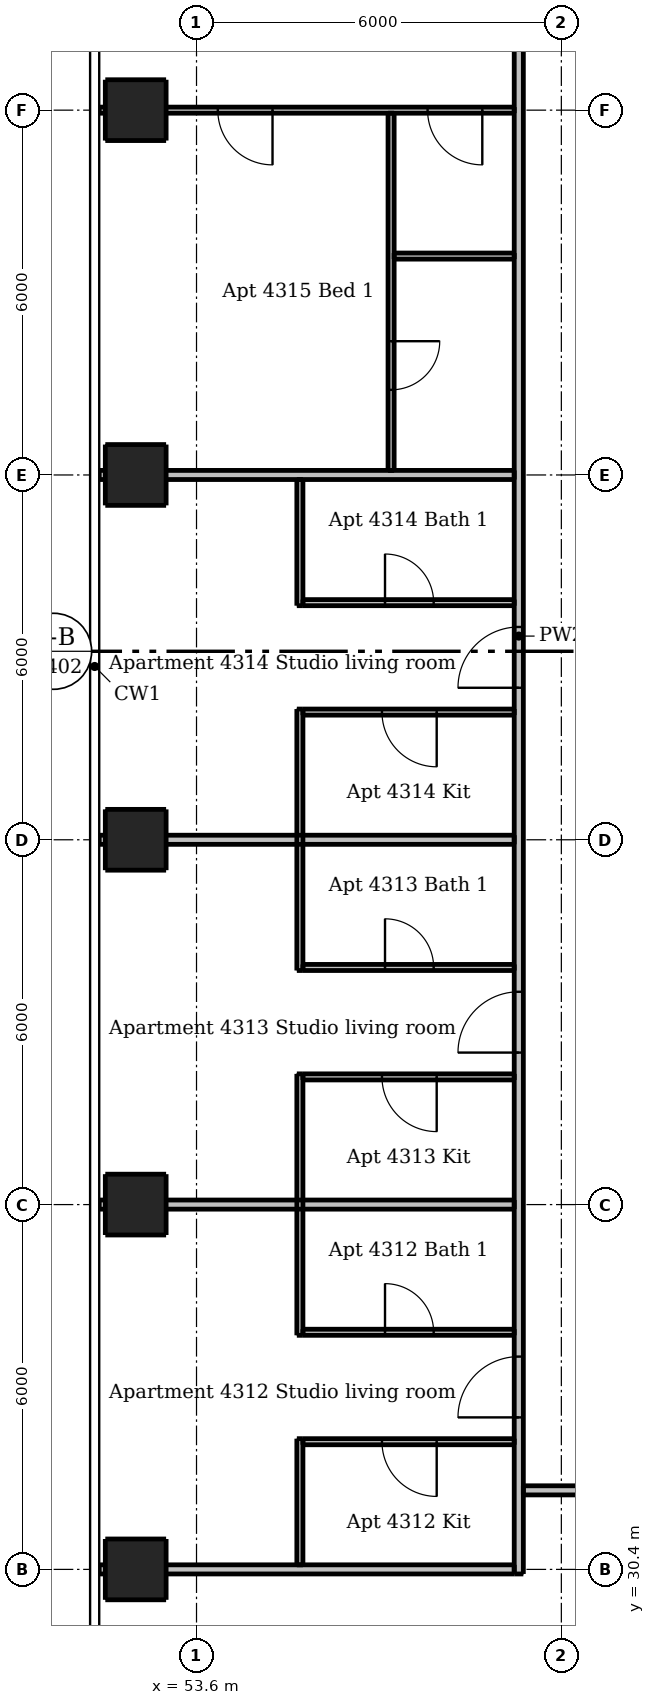
"""IFC4 building model, lengths in metres.
Left out: names, types, materials, properties, quantities, classifications, styles, units other than length and angle.
Written with IfcOpenShell. Run it as: python <this file> out.ifc"""

import sys

from ifc_helpers import new_model, si_unit, direction, frame, frame_2d, origin, origin_2d, place, context, subcontext, project, spatial, rectangle, extrude, element, fill, save


model = new_model("IFC4")
c1 = context("Model", 3, precision=1e-05, world=origin(), true_north=direction((0.0, 1.0)))
c2 = subcontext(c1, "Body", "Model", "MODEL_VIEW")
j1 = project(units=[si_unit("LENGTHUNIT", "METRE"), si_unit("PLANEANGLEUNIT", "RADIAN")], contexts=[c1])
p1 = place(None, origin())
s1 = spatial("IfcSite", under=j1, at=p1, CompositionType="ELEMENT")
p2 = place(p1, origin())
s2 = spatial("IfcBuilding", under=s1, at=p2, CompositionType="ELEMENT")
p3 = place(p2, frame((0.0, 0.0, 161.5)))
s3 = spatial("IfcBuildingStorey", under=s2, at=p3, CompositionType="ELEMENT", Elevation=161.5)
for number, where, z_axis, x_axis in (
    (1, (52.6, 30.4, 0.0), (0.0, 0.0, 1.0), (1.0, 0.0, 0.0)),
    (2, (52.6, 36.4, 0.0), (0.0, 0.0, 1.0), (1.0, 0.0, 0.0)),
    (3, (52.6, 42.4, 0.0), (0.0, 0.0, 1.0), (1.0, 0.0, 0.0)),
    (4, (52.6, 48.4, 0.0), (0.0, 0.0, 1.0), (1.0, 0.0, 0.0)),
    (5, (52.6, 54.4, 0.0), (0.0, 0.0, 1.0), (1.0, 0.0, 0.0)),
):
    element("IfcColumn", number, at=place(p3, frame(where, z_axis=z_axis, x_axis=x_axis)), inside=s3, PredefinedType="COLUMN", context=c2, shape_type="SweptSolid", body=[
        extrude(rectangle(XDim=1.0, YDim=1.0, at=origin_2d()), origin(), (0.0, 0.0, 1.0), 3.05),
    ])
p4 = place(p3, frame((55.3, 30.475, 0.0), z_axis=(0.0, 0.0, 1.0), x_axis=(0.0, 1.0, 0.0)))
e6 = element("IfcWall", 6, at=p4, inside=s3, PredefinedType="PARTITIONING", context=c2, shape_type="SweptSolid", body=[
    extrude(rectangle(XDim=2.075, YDim=0.1, at=frame_2d((1.038, 0.0))), origin(), (0.0, 0.0, 1.0), 3.05),
])
for number, where, z_axis, x_axis in (
    (7, (55.3, 34.25, 0.0), (0.0, 0.0, 1.0), (0.0, 1.0, 0.0)),
    (8, (55.3, 40.25, 0.0), (0.0, 0.0, 1.0), (0.0, 1.0, 0.0)),
):
    element("IfcWall", number, at=place(p3, frame(where, z_axis=z_axis, x_axis=x_axis)), inside=s3, PredefinedType="PARTITIONING", context=c2, shape_type="SweptSolid", body=[
        extrude(rectangle(XDim=4.3, YDim=0.1, at=frame_2d((2.15, 0.0))), origin(), (0.0, 0.0, 1.0), 3.05),
    ])
p5 = place(p3, frame((55.3, 46.25, 0.0), z_axis=(0.0, 0.0, 1.0), x_axis=(0.0, 1.0, 0.0)))
e9 = element("IfcWall", 9, at=p5, inside=s3, PredefinedType="PARTITIONING", context=c2, shape_type="SweptSolid", body=[
    extrude(rectangle(XDim=2.075, YDim=0.1, at=frame_2d((1.038, 0.0))), origin(), (0.0, 0.0, 1.0), 3.05),
])
p6 = place(p3, frame((56.8, 54.35, 0.0), z_axis=(0.0, 0.0, 1.0), x_axis=(0.0, -1.0, 0.0)))
e10 = element("IfcWall", 10, at=p6, inside=s3, PredefinedType="PARTITIONING", context=c2, shape_type="SweptSolid", body=[
    extrude(rectangle(XDim=5.875, YDim=0.1, at=frame_2d((2.938, 0.0))), origin(), (0.0, 0.0, 1.0), 3.05),
])
p7 = place(p6, frame((3.75, 0.0, 0.0)))
e11 = element("IfcOpeningElement", 11, at=p7, cuts=e10, PredefinedType="OPENING", context=c2, shape_type="SweptSolid", body=[
    extrude(rectangle(XDim=0.8, YDim=2.1, at=frame_2d((0.4, 1.05))), frame((0.0, 0.06, 0.0), z_axis=(0.0, -1.0, 0.0), x_axis=(1.0, 0.0, 0.0)), (0.0, 0.0, 1.0), 0.12),
])
p8 = place(p3, frame((58.825, 54.4, 0.0), z_axis=(0.0, 0.0, 1.0), x_axis=(-1.0, 0.0, 0.0)))
e12 = element("IfcWall", 12, at=p8, inside=s3, PredefinedType="PARTITIONING", context=c2, shape_type="SweptSolid", body=[
    extrude(rectangle(XDim=6.825, YDim=0.1, at=frame_2d((3.413, 0.0))), origin(), (0.0, 0.0, 1.0), 2.516),
])
p9 = place(p8, frame((0.525, 0.0, 0.0)))
e13 = element("IfcOpeningElement", 13, at=p9, cuts=e12, PredefinedType="OPENING", context=c2, shape_type="SweptSolid", body=[
    extrude(rectangle(XDim=0.9, YDim=2.1, at=frame_2d((0.45, 1.05))), frame((0.0, 0.06, 0.0), z_axis=(0.0, -1.0, 0.0), x_axis=(1.0, 0.0, 0.0)), (0.0, 0.0, 1.0), 0.12),
])
p10 = place(p8, frame((3.975, 0.0, 0.0)))
e14 = element("IfcOpeningElement", 14, at=p10, cuts=e12, PredefinedType="OPENING", context=c2, shape_type="SweptSolid", body=[
    extrude(rectangle(XDim=0.9, YDim=2.1, at=frame_2d((0.45, 1.05))), frame((0.0, 0.06, 0.0), z_axis=(0.0, -1.0, 0.0), x_axis=(1.0, 0.0, 0.0)), (0.0, 0.0, 1.0), 0.12),
])
p11 = place(p3, frame((56.85, 52.0, 0.0), z_axis=(0.0, 0.0, 1.0), x_axis=(1.0, 0.0, 0.0)))
e15 = element("IfcWall", 15, at=p11, inside=s3, PredefinedType="PARTITIONING", context=c2, shape_type="SweptSolid", body=[
    extrude(rectangle(XDim=1.975, YDim=0.1, at=frame_2d((0.987, 0.0))), origin(), (0.0, 0.0, 1.0), 3.05),
])
p12 = place(p3, frame((55.35, 46.3, 0.0), z_axis=(0.0, 0.0, 1.0), x_axis=(1.0, 0.0, 0.0)))
e16 = element("IfcWall", 16, at=p12, inside=s3, PredefinedType="PARTITIONING", context=c2, shape_type="SweptSolid", body=[
    extrude(rectangle(XDim=3.475, YDim=0.1, at=frame_2d((1.737, 0.0))), origin(), (0.0, 0.0, 1.0), 3.05),
])
p13 = place(p12, frame((1.35, 0.0, 0.0)))
e17 = element("IfcOpeningElement", 17, at=p13, cuts=e16, PredefinedType="OPENING", context=c2, shape_type="SweptSolid", body=[
    extrude(rectangle(XDim=0.8, YDim=2.1, at=frame_2d((0.4, 1.05))), frame((0.0, 0.06, 0.0), z_axis=(0.0, -1.0, 0.0), x_axis=(1.0, 0.0, 0.0)), (0.0, 0.0, 1.0), 0.12),
])
p14 = place(p3, frame((58.825, 44.5, 0.0), z_axis=(0.0, 0.0, 1.0), x_axis=(-1.0, 0.0, 0.0)))
e18 = element("IfcWall", 18, at=p14, inside=s3, PredefinedType="PARTITIONING", context=c2, shape_type="SweptSolid", body=[
    extrude(rectangle(XDim=3.475, YDim=0.1, at=frame_2d((1.737, 0.0))), origin(), (0.0, 0.0, 1.0), 3.05),
])
p15 = place(p14, frame((1.275, 0.0, 0.0)))
e19 = element("IfcOpeningElement", 19, at=p15, cuts=e18, PredefinedType="OPENING", context=c2, shape_type="SweptSolid", body=[
    extrude(rectangle(XDim=0.9, YDim=2.1, at=frame_2d((0.45, 1.05))), frame((0.0, 0.06, 0.0), z_axis=(0.0, -1.0, 0.0), x_axis=(1.0, 0.0, 0.0)), (0.0, 0.0, 1.0), 0.12),
])
p16 = place(p3, frame((55.35, 40.3, 0.0), z_axis=(0.0, 0.0, 1.0), x_axis=(1.0, 0.0, 0.0)))
e20 = element("IfcWall", 20, at=p16, inside=s3, PredefinedType="PARTITIONING", context=c2, shape_type="SweptSolid", body=[
    extrude(rectangle(XDim=3.475, YDim=0.1, at=frame_2d((1.737, 0.0))), origin(), (0.0, 0.0, 1.0), 3.05),
])
p17 = place(p16, frame((1.35, 0.0, 0.0)))
e21 = element("IfcOpeningElement", 21, at=p17, cuts=e20, PredefinedType="OPENING", context=c2, shape_type="SweptSolid", body=[
    extrude(rectangle(XDim=0.8, YDim=2.1, at=frame_2d((0.4, 1.05))), frame((0.0, 0.06, 0.0), z_axis=(0.0, -1.0, 0.0), x_axis=(1.0, 0.0, 0.0)), (0.0, 0.0, 1.0), 0.12),
])
p18 = place(p3, frame((58.825, 38.5, 0.0), z_axis=(0.0, 0.0, 1.0), x_axis=(-1.0, 0.0, 0.0)))
e22 = element("IfcWall", 22, at=p18, inside=s3, PredefinedType="PARTITIONING", context=c2, shape_type="SweptSolid", body=[
    extrude(rectangle(XDim=3.475, YDim=0.1, at=frame_2d((1.737, 0.0))), origin(), (0.0, 0.0, 1.0), 3.05),
])
p19 = place(p18, frame((1.275, 0.0, 0.0)))
e23 = element("IfcOpeningElement", 23, at=p19, cuts=e22, PredefinedType="OPENING", context=c2, shape_type="SweptSolid", body=[
    extrude(rectangle(XDim=0.9, YDim=2.1, at=frame_2d((0.45, 1.05))), frame((0.0, 0.06, 0.0), z_axis=(0.0, -1.0, 0.0), x_axis=(1.0, 0.0, 0.0)), (0.0, 0.0, 1.0), 0.12),
])
p20 = place(p3, frame((55.35, 34.3, 0.0), z_axis=(0.0, 0.0, 1.0), x_axis=(1.0, 0.0, 0.0)))
e24 = element("IfcWall", 24, at=p20, inside=s3, PredefinedType="PARTITIONING", context=c2, shape_type="SweptSolid", body=[
    extrude(rectangle(XDim=3.475, YDim=0.1, at=frame_2d((1.737, 0.0))), origin(), (0.0, 0.0, 1.0), 3.05),
])
p21 = place(p20, frame((1.35, 0.0, 0.0)))
e25 = element("IfcOpeningElement", 25, at=p21, cuts=e24, PredefinedType="OPENING", context=c2, shape_type="SweptSolid", body=[
    extrude(rectangle(XDim=0.8, YDim=2.1, at=frame_2d((0.4, 1.05))), frame((0.0, 0.06, 0.0), z_axis=(0.0, -1.0, 0.0), x_axis=(1.0, 0.0, 0.0)), (0.0, 0.0, 1.0), 0.12),
])
p22 = place(p3, frame((58.825, 32.5, 0.0), z_axis=(0.0, 0.0, 1.0), x_axis=(-1.0, 0.0, 0.0)))
e26 = element("IfcWall", 26, at=p22, inside=s3, PredefinedType="PARTITIONING", context=c2, shape_type="SweptSolid", body=[
    extrude(rectangle(XDim=3.475, YDim=0.1, at=frame_2d((1.737, 0.0))), origin(), (0.0, 0.0, 1.0), 3.05),
])
p23 = place(p22, frame((1.275, 0.0, 0.0)))
e27 = element("IfcOpeningElement", 27, at=p23, cuts=e26, PredefinedType="OPENING", context=c2, shape_type="SweptSolid", body=[
    extrude(rectangle(XDim=0.9, YDim=2.1, at=frame_2d((0.45, 1.05))), frame((0.0, 0.06, 0.0), z_axis=(0.0, -1.0, 0.0), x_axis=(1.0, 0.0, 0.0)), (0.0, 0.0, 1.0), 0.12),
])
p24 = place(p3, frame((58.9, 30.325, 0.0), z_axis=(0.0, 0.0, 1.0), x_axis=(0.0, 1.0, 0.0)))
e28 = element("IfcWall", 28, at=p24, inside=s3, PredefinedType="PARTITIONING", context=c2, shape_type="SweptSolid", body=[
    extrude(rectangle(XDim=30.85, YDim=0.15, at=frame_2d((15.425, 0.0))), origin(), (0.0, 0.0, 1.0), 3.05),
])
p25 = place(p24, frame((2.575, 0.0, 0.0)))
e29 = element("IfcOpeningElement", 29, at=p25, cuts=e28, PredefinedType="OPENING", context=c2, shape_type="SweptSolid", body=[
    extrude(rectangle(XDim=1.0, YDim=2.1, at=frame_2d((0.5, 1.05))), frame((0.0, 0.085, 0.0), z_axis=(0.0, -1.0, 0.0), x_axis=(1.0, 0.0, 0.0)), (0.0, 0.0, 1.0), 0.17),
])
p26 = place(p24, frame((8.575, 0.0, 0.0)))
e30 = element("IfcOpeningElement", 30, at=p26, cuts=e28, PredefinedType="OPENING", context=c2, shape_type="SweptSolid", body=[
    extrude(rectangle(XDim=1.0, YDim=2.1, at=frame_2d((0.5, 1.05))), frame((0.0, 0.085, 0.0), z_axis=(0.0, -1.0, 0.0), x_axis=(1.0, 0.0, 0.0)), (0.0, 0.0, 1.0), 0.17),
])
p27 = place(p24, frame((14.575, 0.0, 0.0)))
e31 = element("IfcOpeningElement", 31, at=p27, cuts=e28, PredefinedType="OPENING", context=c2, shape_type="SweptSolid", body=[
    extrude(rectangle(XDim=1.0, YDim=2.1, at=frame_2d((0.5, 1.05))), frame((0.0, 0.085, 0.0), z_axis=(0.0, -1.0, 0.0), x_axis=(1.0, 0.0, 0.0)), (0.0, 0.0, 1.0), 0.17),
])
p28 = place(p24, frame((26.925, 0.0, 0.0)))
e32 = element("IfcOpeningElement", 32, at=p28, cuts=e28, PredefinedType="OPENING", context=c2, shape_type="SweptSolid", body=[
    extrude(rectangle(XDim=1.0, YDim=2.1, at=frame_2d((0.5, 1.05))), frame((0.0, 0.085, 0.0), z_axis=(0.0, -1.0, 0.0), x_axis=(1.0, 0.0, 0.0)), (0.0, 0.0, 1.0), 0.17),
])
for number, where, z_axis, x_axis in (
    (33, (52.0, 48.4, 0.0), (0.0, 0.0, 1.0), (1.0, 0.0, 0.0)),
    (34, (52.0, 42.4, 0.0), (0.0, 0.0, 1.0), (1.0, 0.0, 0.0)),
    (35, (52.0, 36.4, 0.0), (0.0, 0.0, 1.0), (1.0, 0.0, 0.0)),
):
    element("IfcWall", number, at=place(p3, frame(where, z_axis=z_axis, x_axis=x_axis)), inside=s3, PredefinedType="PARTITIONING", context=c2, shape_type="SweptSolid", body=[
        extrude(rectangle(XDim=6.825, YDim=0.15, at=frame_2d((3.413, 0.0))), origin(), (0.0, 0.0, 1.0), 2.516),
    ])
p29 = place(p3, frame((89.525, 31.7, 0.0), z_axis=(0.0, 0.0, 1.0), x_axis=(-1.0, 0.0, 0.0)))
e36 = element("IfcWall", 36, at=p29, inside=s3, PredefinedType="PARTITIONING", context=c2, shape_type="SweptSolid", body=[
    extrude(rectangle(XDim=30.55, YDim=0.15, at=frame_2d((15.275, 0.0))), origin(), (0.0, 0.0, 1.0), 3.05),
])
p30 = place(p29, frame((26.775, 0.0, 0.0)))
e37 = element("IfcOpeningElement", 37, at=p30, cuts=e36, PredefinedType="OPENING", context=c2, shape_type="SweptSolid", body=[
    extrude(rectangle(XDim=1.0, YDim=2.1, at=frame_2d((0.5, 1.05))), frame((0.0, 0.085, 0.0), z_axis=(0.0, -1.0, 0.0), x_axis=(1.0, 0.0, 0.0)), (0.0, 0.0, 1.0), 0.17),
])
p31 = place(p29, frame((14.425, 0.0, 0.0)))
e38 = element("IfcOpeningElement", 38, at=p31, cuts=e36, PredefinedType="OPENING", context=c2, shape_type="SweptSolid", body=[
    extrude(rectangle(XDim=1.0, YDim=2.1, at=frame_2d((0.5, 1.05))), frame((0.0, 0.085, 0.0), z_axis=(0.0, -1.0, 0.0), x_axis=(1.0, 0.0, 0.0)), (0.0, 0.0, 1.0), 0.17),
])
p32 = place(p29, frame((6.575, 0.0, 0.0)))
e39 = element("IfcOpeningElement", 39, at=p32, cuts=e36, PredefinedType="OPENING", context=c2, shape_type="SweptSolid", body=[
    extrude(rectangle(XDim=1.0, YDim=2.1, at=frame_2d((0.5, 1.05))), frame((0.0, 0.085, 0.0), z_axis=(0.0, -1.0, 0.0), x_axis=(1.0, 0.0, 0.0)), (0.0, 0.0, 1.0), 0.17),
])
p33 = place(p3, frame((52.0, 30.4, 0.0), z_axis=(0.0, 0.0, 1.0), x_axis=(1.0, 0.0, 0.0)))
e40 = element("IfcWall", 40, at=p33, inside=s3, PredefinedType="PARTITIONING", context=c2, shape_type="SweptSolid", body=[
    extrude(rectangle(XDim=6.825, YDim=0.15, at=frame_2d((3.413, 0.0))), origin(), (0.0, 0.0, 1.0), 2.647),
])
p34 = place(p25, origin())
e41 = element("IfcDoor", 41, at=p34, inside=s3, OperationType="SINGLE_SWING_LEFT", PredefinedType="DOOR", context=c2, shape_type="SweptSolid", body=[
    extrude(rectangle(XDim=1.0, YDim=2.1, at=frame_2d((0.5, 1.05))), frame((0.0, 0.025, 0.0), z_axis=(0.0, -1.0, 0.0), x_axis=(1.0, 0.0, 0.0)), (0.0, 0.0, 1.0), 0.05),
])
fill(e29, e41)
p35 = place(p23, origin())
e42 = element("IfcDoor", 42, at=p35, inside=s3, OperationType="SINGLE_SWING_LEFT", PredefinedType="DOOR", context=c2, shape_type="SweptSolid", body=[
    extrude(rectangle(XDim=0.9, YDim=2.1, at=frame_2d((0.45, 1.05))), frame((0.0, 0.025, 0.0), z_axis=(0.0, -1.0, 0.0), x_axis=(1.0, 0.0, 0.0)), (0.0, 0.0, 1.0), 0.05),
])
fill(e27, e42)
p36 = place(p21, origin())
e43 = element("IfcDoor", 43, at=p36, inside=s3, OperationType="SINGLE_SWING_LEFT", PredefinedType="DOOR", context=c2, shape_type="SweptSolid", body=[
    extrude(rectangle(XDim=0.8, YDim=2.1, at=frame_2d((0.4, 1.05))), frame((0.0, 0.025, 0.0), z_axis=(0.0, -1.0, 0.0), x_axis=(1.0, 0.0, 0.0)), (0.0, 0.0, 1.0), 0.05),
])
fill(e25, e43)
p37 = place(p26, origin())
e44 = element("IfcDoor", 44, at=p37, inside=s3, OperationType="SINGLE_SWING_LEFT", PredefinedType="DOOR", context=c2, shape_type="SweptSolid", body=[
    extrude(rectangle(XDim=1.0, YDim=2.1, at=frame_2d((0.5, 1.05))), frame((0.0, 0.025, 0.0), z_axis=(0.0, -1.0, 0.0), x_axis=(1.0, 0.0, 0.0)), (0.0, 0.0, 1.0), 0.05),
])
fill(e30, e44)
p38 = place(p19, origin())
e45 = element("IfcDoor", 45, at=p38, inside=s3, OperationType="SINGLE_SWING_LEFT", PredefinedType="DOOR", context=c2, shape_type="SweptSolid", body=[
    extrude(rectangle(XDim=0.9, YDim=2.1, at=frame_2d((0.45, 1.05))), frame((0.0, 0.025, 0.0), z_axis=(0.0, -1.0, 0.0), x_axis=(1.0, 0.0, 0.0)), (0.0, 0.0, 1.0), 0.05),
])
fill(e23, e45)
p39 = place(p17, origin())
e46 = element("IfcDoor", 46, at=p39, inside=s3, OperationType="SINGLE_SWING_LEFT", PredefinedType="DOOR", context=c2, shape_type="SweptSolid", body=[
    extrude(rectangle(XDim=0.8, YDim=2.1, at=frame_2d((0.4, 1.05))), frame((0.0, 0.025, 0.0), z_axis=(0.0, -1.0, 0.0), x_axis=(1.0, 0.0, 0.0)), (0.0, 0.0, 1.0), 0.05),
])
fill(e21, e46)
p40 = place(p27, origin())
e47 = element("IfcDoor", 47, at=p40, inside=s3, OperationType="SINGLE_SWING_LEFT", PredefinedType="DOOR", context=c2, shape_type="SweptSolid", body=[
    extrude(rectangle(XDim=1.0, YDim=2.1, at=frame_2d((0.5, 1.05))), frame((0.0, 0.025, 0.0), z_axis=(0.0, -1.0, 0.0), x_axis=(1.0, 0.0, 0.0)), (0.0, 0.0, 1.0), 0.05),
])
fill(e31, e47)
p41 = place(p15, origin())
e48 = element("IfcDoor", 48, at=p41, inside=s3, OperationType="SINGLE_SWING_LEFT", PredefinedType="DOOR", context=c2, shape_type="SweptSolid", body=[
    extrude(rectangle(XDim=0.9, YDim=2.1, at=frame_2d((0.45, 1.05))), frame((0.0, 0.025, 0.0), z_axis=(0.0, -1.0, 0.0), x_axis=(1.0, 0.0, 0.0)), (0.0, 0.0, 1.0), 0.05),
])
fill(e19, e48)
p42 = place(p13, origin())
e49 = element("IfcDoor", 49, at=p42, inside=s3, OperationType="SINGLE_SWING_LEFT", PredefinedType="DOOR", context=c2, shape_type="SweptSolid", body=[
    extrude(rectangle(XDim=0.8, YDim=2.1, at=frame_2d((0.4, 1.05))), frame((0.0, 0.025, 0.0), z_axis=(0.0, -1.0, 0.0), x_axis=(1.0, 0.0, 0.0)), (0.0, 0.0, 1.0), 0.05),
])
fill(e17, e49)
p43 = place(p9, origin())
e50 = element("IfcDoor", 50, at=p43, inside=s3, OperationType="SINGLE_SWING_LEFT", PredefinedType="DOOR", context=c2, shape_type="SweptSolid", body=[
    extrude(rectangle(XDim=0.9, YDim=2.1, at=frame_2d((0.45, 1.05))), frame((0.0, 0.025, 0.0), z_axis=(0.0, -1.0, 0.0), x_axis=(1.0, 0.0, 0.0)), (0.0, 0.0, 1.0), 0.05),
])
fill(e13, e50)
p44 = place(p10, origin())
e51 = element("IfcDoor", 51, at=p44, inside=s3, OperationType="SINGLE_SWING_LEFT", PredefinedType="DOOR", context=c2, shape_type="SweptSolid", body=[
    extrude(rectangle(XDim=0.9, YDim=2.1, at=frame_2d((0.45, 1.05))), frame((0.0, 0.025, 0.0), z_axis=(0.0, -1.0, 0.0), x_axis=(1.0, 0.0, 0.0)), (0.0, 0.0, 1.0), 0.05),
])
fill(e14, e51)
p45 = place(p7, origin())
e52 = element("IfcDoor", 52, at=p45, inside=s3, OperationType="SINGLE_SWING_LEFT", PredefinedType="DOOR", context=c2, shape_type="SweptSolid", body=[
    extrude(rectangle(XDim=0.8, YDim=2.1, at=frame_2d((0.4, 1.05))), frame((0.0, 0.025, 0.0), z_axis=(0.0, -1.0, 0.0), x_axis=(1.0, 0.0, 0.0)), (0.0, 0.0, 1.0), 0.05),
])
fill(e11, e52)
save(model, sys.argv[1])
